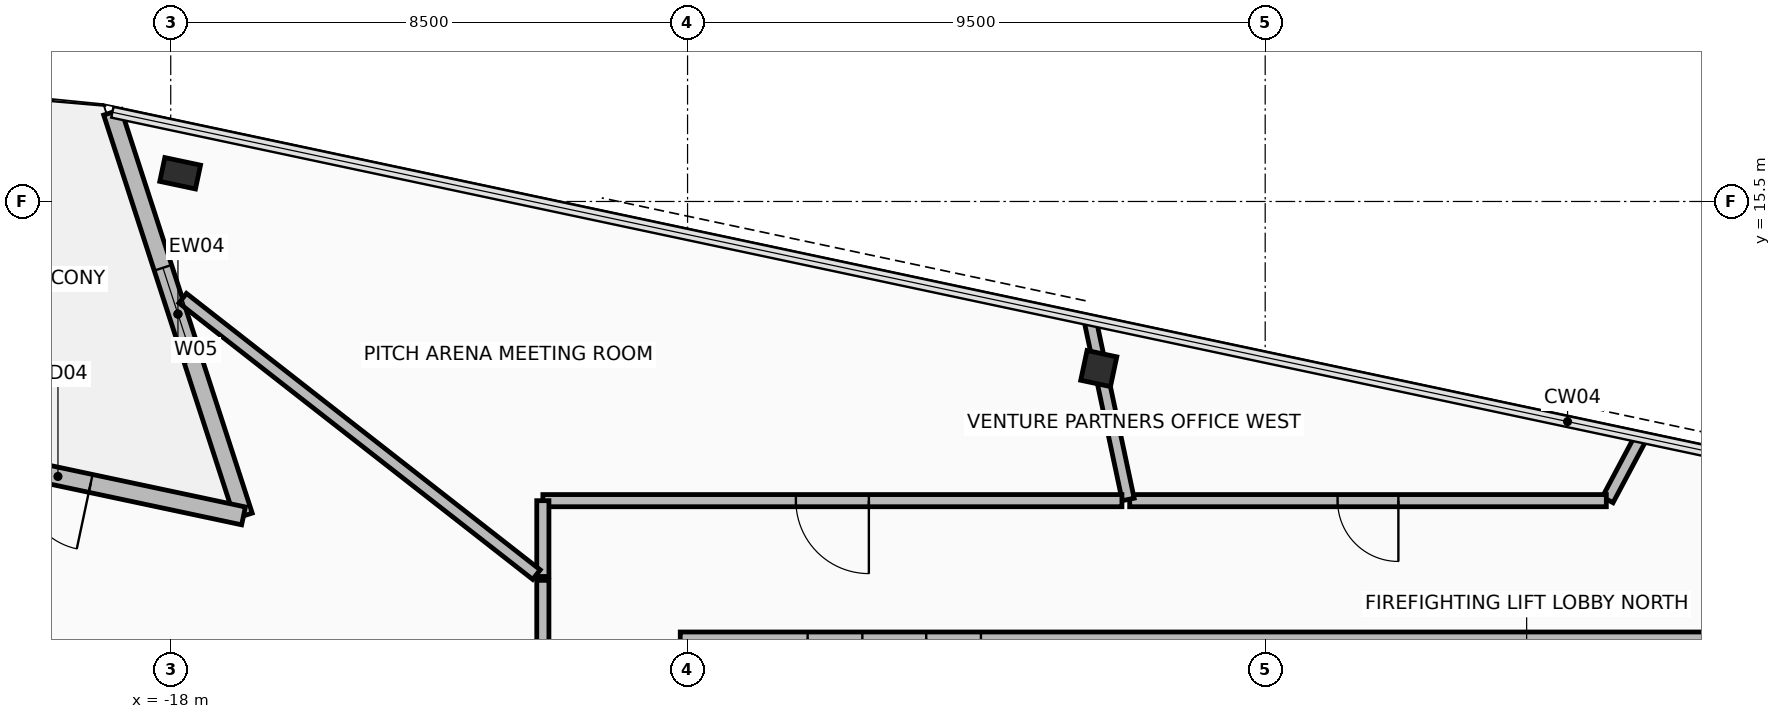
"""IFC4 building model, lengths in metres.
Left out: names, types, materials, properties, quantities, classifications, styles, units other than length and angle.
Written with IfcOpenShell. Run it as: python <this file> out.ifc"""

import sys

from ifc_helpers import new_model, si_unit, direction, frame, frame_2d, origin, origin_2d, place, context, subcontext, project, spatial, rectangle, hollow_rectangle, extrude, element, fill, save


model = new_model("IFC4")
c1 = context("Model", 3, precision=1e-05, world=origin(), true_north=direction((0.0, 1.0)))
c2 = subcontext(c1, "Body", "Model", "MODEL_VIEW")
j1 = project(units=[si_unit("LENGTHUNIT", "METRE"), si_unit("PLANEANGLEUNIT", "RADIAN")], contexts=[c1])
p1 = place(None, origin())
s1 = spatial("IfcSite", under=j1, at=p1, CompositionType="ELEMENT")
p2 = place(p1, origin())
s2 = spatial("IfcBuilding", under=s1, at=p2, CompositionType="ELEMENT")
p3 = place(p2, frame((0.0, 0.0, 204.05)))
s3 = spatial("IfcBuildingStorey", under=s2, at=p3, CompositionType="ELEMENT", Elevation=204.05)
p4 = place(p3, frame((-2.737, 12.753, 0.0), z_axis=(0.0, 0.0, 1.0), x_axis=(-0.978147600734, 0.207911690818, 0.0)))
e1 = element("IfcColumn", 1, at=p4, inside=s3, PredefinedType="COLUMN", context=c2, shape_type="SweptSolid", body=[
    extrude(hollow_rectangle(XDim=0.5, YDim=0.5, WallThickness=0.032, at=origin_2d()), origin(), (0.0, 0.0, 1.0), 3.6),
])
p5 = place(p3, frame((-17.845, 15.964, 0.0), z_axis=(0.0, 0.0, 1.0), x_axis=(-0.978147600734, 0.207911690818, 0.0)))
e2 = element("IfcColumn", 2, at=p5, inside=s3, PredefinedType="COLUMN", context=c2, shape_type="SweptSolid", body=[
    extrude(hollow_rectangle(XDim=0.4, YDim=0.6, WallThickness=0.03, at=origin_2d()), origin(), (0.0, 0.0, 1.0), 3.6),
])
p6 = place(p3, frame((-18.96, 16.968, 0.0), z_axis=(0.0, 0.0, 1.0), x_axis=(0.309030708092, -0.951052060329, 0.0)))
e3 = element("IfcWall", 3, at=p6, inside=s3, PredefinedType="STANDARD", context=c2, shape_type="SweptSolid", body=[
    extrude(rectangle(XDim=6.98, YDim=0.3, at=frame_2d((3.49, 0.0))), origin(), (0.0, 0.0, 1.0), 2.715),
])
p7 = place(p6, frame((2.69, 0.0, 0.335)))
e4 = element("IfcOpeningElement", 4, at=p7, cuts=e3, PredefinedType="OPENING", context=c2, shape_type="SweptSolid", body=[
    extrude(rectangle(XDim=1.6, YDim=2.2, at=frame_2d((0.8, 1.1))), frame((0.0, 0.16, 0.0), z_axis=(0.0, -1.0, 0.0), x_axis=(1.0, 0.0, 0.0)), (0.0, 0.0, 1.0), 0.32),
])
p8 = place(p3, frame((-16.803, 10.329, 0.0), z_axis=(0.0, 0.0, 1.0), x_axis=(-0.9781486268, 0.207906863497, 0.0)))
e5 = element("IfcWall", 5, at=p8, inside=s3, PredefinedType="STANDARD", context=c2, shape_type="SweptSolid", body=[
    extrude(rectangle(XDim=6.98, YDim=0.3, at=frame_2d((3.49, 0.0))), origin(), (0.0, 0.0, 1.0), 2.715),
])
p9 = place(p8, frame((2.57, 0.0, 0.0)))
e6 = element("IfcOpeningElement", 6, at=p9, cuts=e5, PredefinedType="OPENING", context=c2, shape_type="SweptSolid", body=[
    extrude(rectangle(XDim=1.1, YDim=2.2, at=frame_2d((0.55, 1.1))), frame((0.0, 0.16, 0.0), z_axis=(0.0, -1.0, 0.0), x_axis=(1.0, 0.0, 0.0)), (0.0, 0.0, 1.0), 0.32),
])
p10 = place(p3, frame((9.62, 8.32, 0.0), z_axis=(0.0, 0.0, 1.0), x_axis=(-1.0, 0.0, 0.0)))
e7 = element("IfcWall", 7, at=p10, inside=s3, PredefinedType="PARTITIONING", context=c2, shape_type="SweptSolid", body=[
    extrude(rectangle(XDim=19.24, YDim=0.2, at=frame_2d((9.62, 0.0))), origin(), (0.0, 0.0, 1.0), 2.865),
])
p11 = place(p10, frame((16.245, 0.0, 0.0)))
e8 = element("IfcOpeningElement", 8, at=p11, cuts=e7, PredefinedType="OPENING", context=c2, shape_type="SweptSolid", body=[
    extrude(rectangle(XDim=0.9, YDim=2.1, at=frame_2d((0.45, 1.05))), frame((0.0, 0.11, 0.0), z_axis=(0.0, -1.0, 0.0), x_axis=(1.0, 0.0, 0.0)), (0.0, 0.0, 1.0), 0.22),
])
p12 = place(p10, frame((14.295, 0.0, 0.0)))
e9 = element("IfcOpeningElement", 9, at=p12, cuts=e7, PredefinedType="OPENING", context=c2, shape_type="SweptSolid", body=[
    extrude(rectangle(XDim=0.9, YDim=2.1, at=frame_2d((0.45, 1.05))), frame((0.0, 0.11, 0.0), z_axis=(0.0, -1.0, 0.0), x_axis=(1.0, 0.0, 0.0)), (0.0, 0.0, 1.0), 0.22),
])
p13 = place(p3, frame((6.181, 11.624, 0.0), z_axis=(0.0, 0.0, 1.0), x_axis=(-0.469578283784, -0.882890840024, 0.0)))
e10 = element("IfcWall", 10, at=p13, inside=s3, PredefinedType="PARTITIONING", context=c2, shape_type="SweptSolid", body=[
    extrude(rectangle(XDim=1.167, YDim=0.2, at=frame_2d((0.583, 0.0))), origin(), (0.0, 0.0, 1.0), 2.715),
])
p14 = place(p3, frame((5.611, 10.58, 0.0), z_axis=(0.0, 0.0, 1.0), x_axis=(-1.0, 0.0, 0.0)))
e11 = element("IfcWall", 11, at=p14, inside=s3, PredefinedType="PARTITIONING", context=c2, shape_type="SweptSolid", body=[
    extrude(rectangle(XDim=7.839, YDim=0.2, at=frame_2d((3.919, 0.0))), origin(), (0.0, 0.0, 1.0), 2.865),
])
p15 = place(p14, frame((3.42, 0.0, 0.0)))
e12 = element("IfcOpeningElement", 12, at=p15, cuts=e11, PredefinedType="OPENING", context=c2, shape_type="SweptSolid", body=[
    extrude(rectangle(XDim=1.0, YDim=2.15, at=frame_2d((0.5, 1.075))), frame((0.0, 0.11, 0.0), z_axis=(0.0, -1.0, 0.0), x_axis=(1.0, 0.0, 0.0)), (0.0, 0.0, 1.0), 0.22),
])
p16 = place(p3, frame((-2.253, 10.6, 0.0), z_axis=(0.0, 0.0, 1.0), x_axis=(-0.207886833255, 0.978152884042, 0.0)))
e13 = element("IfcWall", 13, at=p16, inside=s3, PredefinedType="PARTITIONING", context=c2, shape_type="SweptSolid", body=[
    extrude(rectangle(XDim=3.016, YDim=0.2, at=frame_2d((1.508, 0.0))), origin(), (0.0, 0.0, 1.0), 2.715),
])
p17 = place(p3, frame((-2.356, 10.58, 0.0), z_axis=(0.0, 0.0, 1.0), x_axis=(-1.0, 0.0, 0.0)))
e14 = element("IfcWall", 14, at=p17, inside=s3, PredefinedType="PARTITIONING", context=c2, shape_type="SweptSolid", body=[
    extrude(rectangle(XDim=9.523, YDim=0.2, at=frame_2d((4.762, 0.0))), origin(), (0.0, 0.0, 1.0), 2.865),
])
p18 = place(p17, frame((4.162, 0.0, 0.0)))
e15 = element("IfcOpeningElement", 15, at=p18, cuts=e14, PredefinedType="OPENING", context=c2, shape_type="SweptSolid", body=[
    extrude(rectangle(XDim=1.2, YDim=2.15, at=frame_2d((0.6, 1.075))), frame((0.0, 0.11, 0.0), z_axis=(0.0, -1.0, 0.0), x_axis=(1.0, 0.0, 0.0)), (0.0, 0.0, 1.0), 0.22),
])
p19 = place(p3, frame((-11.88, 10.579, 0.0), z_axis=(0.0, 0.0, 1.0), x_axis=(0.0, -1.0, 0.0)))
e16 = element("IfcWall", 16, at=p19, inside=s3, PredefinedType="PARTITIONING", context=c2, shape_type="SweptSolid", body=[
    extrude(rectangle(XDim=1.246, YDim=0.2, at=frame_2d((0.623, 0.0))), origin(), (0.0, 0.0, 1.0), 2.765),
])
p20 = place(p3, frame((-11.985, 9.364, 0.0), z_axis=(0.0, 0.0, 1.0), x_axis=(-0.788011338845, 0.615660726254, 0.0)))
e17 = element("IfcWall", 17, at=p20, inside=s3, PredefinedType="PARTITIONING", context=c2, shape_type="SweptSolid", body=[
    extrude(rectangle(XDim=7.383, YDim=0.2, at=frame_2d((3.691, 0.0))), origin(), (0.0, 0.0, 1.0), 2.765),
])
p21 = place(p3, frame((-11.88, 9.27, 0.0), z_axis=(0.0, 0.0, 1.0), x_axis=(0.0, -1.0, 0.0)))
e18 = element("IfcWall", 18, at=p21, inside=s3, PredefinedType="PARTITIONING", context=c2, shape_type="SweptSolid", body=[
    extrude(rectangle(XDim=10.496, YDim=0.2, at=frame_2d((5.248, 0.0))), origin(), (0.0, 0.0, 1.0), 2.765),
])
p22 = place(p21, frame((4.748, 0.0, 0.0)))
e19 = element("IfcOpeningElement", 19, at=p22, cuts=e18, PredefinedType="OPENING", context=c2, shape_type="SweptSolid", body=[
    extrude(rectangle(XDim=1.0, YDim=2.15, at=frame_2d((0.5, 1.075))), frame((0.0, 0.11, 0.0), z_axis=(0.0, -1.0, 0.0), x_axis=(1.0, 0.0, 0.0)), (0.0, 0.0, 1.0), 0.22),
])
p23 = place(p9, origin())
e20 = element("IfcDoor", 20, at=p23, inside=s3, OperationType="SINGLE_SWING_LEFT", PredefinedType="DOOR", context=c2, shape_type="SweptSolid", body=[
    extrude(rectangle(XDim=1.1, YDim=2.2, at=frame_2d((0.55, 1.1))), frame((0.0, 0.025, 0.0), z_axis=(0.0, -1.0, 0.0), x_axis=(1.0, 0.0, 0.0)), (0.0, 0.0, 1.0), 0.05),
])
fill(e6, e20)
p24 = place(p7, origin())
e21 = element("IfcWindow", 21, at=p24, inside=s3, PartitioningType="SINGLE_PANEL", PredefinedType="WINDOW", context=c2, shape_type="SweptSolid", body=[
    extrude(rectangle(XDim=1.6, YDim=2.2, at=frame_2d((0.8, 1.1))), frame((0.0, 0.03, 0.0), z_axis=(0.0, -1.0, 0.0), x_axis=(1.0, 0.0, 0.0)), (0.0, 0.0, 1.0), 0.06),
])
fill(e4, e21)
p25 = place(p11, frame((0.9, 0.0, 0.0), z_axis=(0.0, 0.0, 1.0), x_axis=(-1.0, 0.0, 0.0)))
e22 = element("IfcDoor", 22, at=p25, inside=s3, OperationType="SINGLE_SWING_LEFT", PredefinedType="DOOR", context=c2, shape_type="SweptSolid", body=[
    extrude(rectangle(XDim=0.9, YDim=2.1, at=frame_2d((0.45, 1.05))), frame((0.0, 0.025, 0.0), z_axis=(0.0, -1.0, 0.0), x_axis=(1.0, 0.0, 0.0)), (0.0, 0.0, 1.0), 0.05),
])
fill(e8, e22)
p26 = place(p12, frame((0.9, 0.0, 0.0), z_axis=(0.0, 0.0, 1.0), x_axis=(-1.0, 0.0, 0.0)))
e23 = element("IfcDoor", 23, at=p26, inside=s3, OperationType="SINGLE_SWING_LEFT", PredefinedType="DOOR", context=c2, shape_type="SweptSolid", body=[
    extrude(rectangle(XDim=0.9, YDim=2.1, at=frame_2d((0.45, 1.05))), frame((0.0, 0.025, 0.0), z_axis=(0.0, -1.0, 0.0), x_axis=(1.0, 0.0, 0.0)), (0.0, 0.0, 1.0), 0.05),
])
fill(e9, e23)
p27 = place(p15, origin())
e24 = element("IfcDoor", 24, at=p27, inside=s3, OperationType="SINGLE_SWING_RIGHT", PredefinedType="DOOR", context=c2, shape_type="SweptSolid", body=[
    extrude(rectangle(XDim=1.0, YDim=2.15, at=frame_2d((0.5, 1.075))), frame((0.0, 0.025, 0.0), z_axis=(0.0, -1.0, 0.0), x_axis=(1.0, 0.0, 0.0)), (0.0, 0.0, 1.0), 0.05),
])
fill(e12, e24)
p28 = place(p18, origin())
e25 = element("IfcDoor", 25, at=p28, inside=s3, OperationType="SINGLE_SWING_LEFT", PredefinedType="DOOR", context=c2, shape_type="SweptSolid", body=[
    extrude(rectangle(XDim=1.2, YDim=2.15, at=frame_2d((0.6, 1.075))), frame((0.0, 0.025, 0.0), z_axis=(0.0, -1.0, 0.0), x_axis=(1.0, 0.0, 0.0)), (0.0, 0.0, 1.0), 0.05),
])
fill(e15, e25)
save(model, sys.argv[1])
